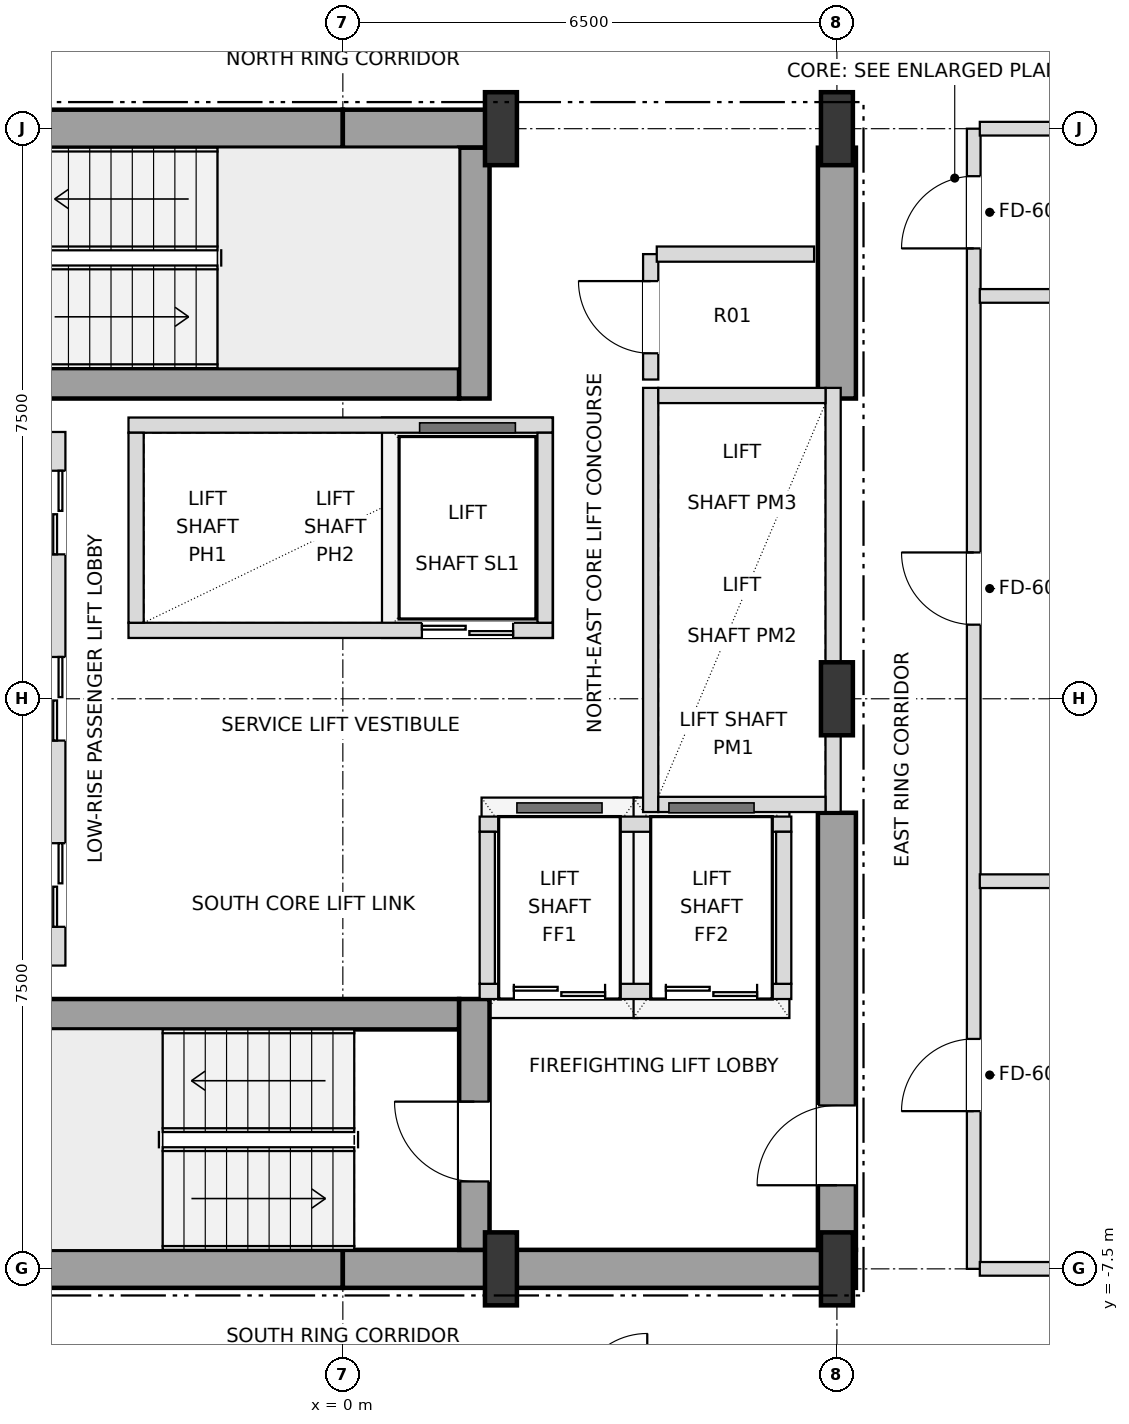
"""IFC4 building model, lengths in metres.
Left out: names, types, materials, properties, quantities, classifications, styles, units other than length and angle.
Written with IfcOpenShell. Run it as: python <this file> out.ifc"""

import sys

from ifc_helpers import new_model, si_unit, direction, frame, frame_2d, origin, origin_2d, place, context, subcontext, project, spatial, rectangle, i_section, extrude, element, fill, save


model = new_model("IFC4")
c1 = context("Model", 3, precision=1e-05, world=origin(), true_north=direction((0.0, 1.0)))
c2 = subcontext(c1, "Body", "Model", "MODEL_VIEW")
j1 = project(units=[si_unit("LENGTHUNIT", "METRE"), si_unit("PLANEANGLEUNIT", "RADIAN")], contexts=[c1])
p1 = place(None, origin())
s1 = spatial("IfcSite", under=j1, at=p1, CompositionType="ELEMENT")
p2 = place(p1, origin())
s2 = spatial("IfcBuilding", under=s1, at=p2, CompositionType="ELEMENT")
p3 = place(p2, frame((0.0, 0.0, 82.8)))
s3 = spatial("IfcBuildingStorey", under=s2, at=p3, CompositionType="ELEMENT", Elevation=82.8)
for number, where, z_axis, x_axis in (
    (1, (2.08, -7.5, 0.0), (0.0, 0.0, 1.0), (1.0, 0.0, 0.0)),
    (2, (6.5, -7.5, 0.0), (0.0, 0.0, 1.0), (1.0, 0.0, 0.0)),
    (3, (6.5, 0.0, 0.0), (0.0, 0.0, 1.0), (1.0, 0.0, 0.0)),
    (4, (2.08, 7.5, 0.0), (0.0, 0.0, 1.0), (1.0, 0.0, 0.0)),
    (5, (6.5, 7.5, 0.0), (0.0, 0.0, 1.0), (1.0, 0.0, 0.0)),
):
    element("IfcColumn", number, at=place(p3, frame(where, z_axis=z_axis, x_axis=x_axis)), inside=s3, PredefinedType="COLUMN", context=c2, shape_type="SweptSolid", body=[
        extrude(i_section(OverallWidth=0.42, OverallDepth=0.96, WebThickness=0.022, FlangeThickness=0.034, at=origin_2d()), origin(), (0.0, 0.0, 1.0), 3.6),
    ])
for number, where, z_axis, x_axis in (
    (6, (-6.75, -7.5, 0.0), (0.0, 0.0, 1.0), (1.0, 0.0, 0.0)),
    (7, (0.0, -7.5, 0.0), (0.0, 0.0, 1.0), (1.0, 0.0, 0.0)),
):
    element("IfcWall", number, at=place(p3, frame(where, z_axis=z_axis, x_axis=x_axis)), inside=s3, PredefinedType="SHEAR", context=c2, shape_type="SweptSolid", body=[
        extrude(rectangle(XDim=6.75, YDim=0.5, at=frame_2d((3.375, 0.0))), origin(), (0.0, 0.0, 1.0), 3.38),
    ])
p4 = place(p3, frame((-6.75, 7.5, 0.0), z_axis=(0.0, 0.0, 1.0), x_axis=(1.0, 0.0, 0.0)))
e8 = element("IfcWall", 8, at=p4, inside=s3, PredefinedType="SHEAR", context=c2, shape_type="SweptSolid", body=[
    extrude(rectangle(XDim=6.75, YDim=0.5, at=frame_2d((3.375, 0.0))), origin(), (0.0, 0.0, 1.0), 3.38),
])
p5 = place(p4, frame((1.65, 0.0, 0.0)))
e9 = element("IfcOpeningElement", 9, at=p5, cuts=e8, PredefinedType="OPENING", context=c2, shape_type="SweptSolid", body=[
    extrude(rectangle(XDim=1.05, YDim=2.15, at=frame_2d((0.525, 1.075))), frame((0.0, 0.26, 0.0), z_axis=(0.0, -1.0, 0.0), x_axis=(1.0, 0.0, 0.0)), (0.0, 0.0, 1.0), 0.52),
])
p6 = place(p3, frame((0.0, 7.5, 0.0), z_axis=(0.0, 0.0, 1.0), x_axis=(1.0, 0.0, 0.0)))
e10 = element("IfcWall", 10, at=p6, inside=s3, PredefinedType="SHEAR", context=c2, shape_type="SweptSolid", body=[
    extrude(rectangle(XDim=2.08, YDim=0.5, at=frame_2d((1.04, 0.0))), origin(), (0.0, 0.0, 1.0), 3.38),
])
p7 = place(p3, frame((6.5, -7.25, 0.0), z_axis=(0.0, 0.0, 1.0), x_axis=(0.0, 1.0, 0.0)))
e11 = element("IfcWall", 11, at=p7, inside=s3, PredefinedType="SHEAR", context=c2, shape_type="SweptSolid", body=[
    extrude(rectangle(XDim=5.75, YDim=0.5, at=frame_2d((2.875, 0.0))), origin(), (0.0, 0.0, 1.0), 3.38),
])
p8 = place(p7, frame((0.85, 0.0, 0.0)))
e12 = element("IfcOpeningElement", 12, at=p8, cuts=e11, PredefinedType="OPENING", context=c2, shape_type="SweptSolid", body=[
    extrude(rectangle(XDim=1.05, YDim=2.15, at=frame_2d((0.525, 1.075))), frame((0.0, 0.26, 0.0), z_axis=(0.0, -1.0, 0.0), x_axis=(1.0, 0.0, 0.0)), (0.0, 0.0, 1.0), 0.52),
])
p9 = place(p3, frame((6.5, 3.95, 0.0), z_axis=(0.0, 0.0, 1.0), x_axis=(0.0, 1.0, 0.0)))
e13 = element("IfcWall", 13, at=p9, inside=s3, PredefinedType="SHEAR", context=c2, shape_type="SweptSolid", body=[
    extrude(rectangle(XDim=3.3, YDim=0.5, at=frame_2d((1.65, 0.0))), origin(), (0.0, 0.0, 1.0), 3.38),
])
p10 = place(p3, frame((-6.25, -4.15, 0.0), z_axis=(0.0, 0.0, 1.0), x_axis=(1.0, 0.0, 0.0)))
e14 = element("IfcWall", 14, at=p10, inside=s3, PredefinedType="SHEAR", context=c2, shape_type="SweptSolid", body=[
    extrude(rectangle(XDim=7.78, YDim=0.4, at=frame_2d((3.89, 0.0))), origin(), (0.0, 0.0, 1.0), 3.38),
])
p11 = place(p3, frame((1.73, -7.25, 0.0), z_axis=(0.0, 0.0, 1.0), x_axis=(0.0, 1.0, 0.0)))
e15 = element("IfcWall", 15, at=p11, inside=s3, PredefinedType="SHEAR", context=c2, shape_type="SweptSolid", body=[
    extrude(rectangle(XDim=3.3, YDim=0.4, at=frame_2d((1.65, 0.0))), origin(), (0.0, 0.0, 1.0), 3.38),
])
p12 = place(p11, frame((0.9, 0.0, 0.0)))
e16 = element("IfcOpeningElement", 16, at=p12, cuts=e15, PredefinedType="OPENING", context=c2, shape_type="SweptSolid", body=[
    extrude(rectangle(XDim=1.05, YDim=2.15, at=frame_2d((0.525, 1.075))), frame((0.0, 0.21, 0.0), z_axis=(0.0, -1.0, 0.0), x_axis=(1.0, 0.0, 0.0)), (0.0, 0.0, 1.0), 0.42),
])
p13 = place(p3, frame((-5.55, 4.15, 0.0), z_axis=(0.0, 0.0, 1.0), x_axis=(1.0, 0.0, 0.0)))
e17 = element("IfcWall", 17, at=p13, inside=s3, PredefinedType="SHEAR", context=c2, shape_type="SweptSolid", body=[
    extrude(rectangle(XDim=7.08, YDim=0.4, at=frame_2d((3.54, 0.0))), origin(), (0.0, 0.0, 1.0), 3.38),
])
p14 = place(p3, frame((1.73, 3.95, 0.0), z_axis=(0.0, 0.0, 1.0), x_axis=(0.0, 1.0, 0.0)))
e18 = element("IfcWall", 18, at=p14, inside=s3, PredefinedType="SHEAR", context=c2, shape_type="SweptSolid", body=[
    extrude(rectangle(XDim=3.3, YDim=0.4, at=frame_2d((1.65, 0.0))), origin(), (0.0, 0.0, 1.0), 3.38),
])
p15 = place(p3, frame((-3.75, -3.51, 0.0), z_axis=(0.0, 0.0, 1.0), x_axis=(0.0, 1.0, 0.0)))
e19 = element("IfcWall", 19, at=p15, inside=s3, PredefinedType="SOLIDWALL", context=c2, shape_type="SweptSolid", body=[
    extrude(rectangle(XDim=7.02, YDim=0.2, at=frame_2d((3.51, 0.0))), origin(), (0.0, 0.0, 1.0), 3.38),
])
p16 = place(p15, frame((0.51, 0.0, 0.0)))
e20 = element("IfcOpeningElement", 20, at=p16, cuts=e19, PredefinedType="OPENING", context=c2, shape_type="SweptSolid", body=[
    extrude(rectangle(XDim=1.1, YDim=2.15, at=frame_2d((0.55, 1.075))), frame((0.0, 0.11, 0.0), z_axis=(0.0, -1.0, 0.0), x_axis=(1.0, 0.0, 0.0)), (0.0, 0.0, 1.0), 0.22),
])
p17 = place(p15, frame((2.96, 0.0, 0.0)))
e21 = element("IfcOpeningElement", 21, at=p17, cuts=e19, PredefinedType="OPENING", context=c2, shape_type="SweptSolid", body=[
    extrude(rectangle(XDim=1.1, YDim=2.15, at=frame_2d((0.55, 1.075))), frame((0.0, 0.11, 0.0), z_axis=(0.0, -1.0, 0.0), x_axis=(1.0, 0.0, 0.0)), (0.0, 0.0, 1.0), 0.22),
])
p18 = place(p15, frame((5.41, 0.0, 0.0)))
e22 = element("IfcOpeningElement", 22, at=p18, cuts=e19, PredefinedType="OPENING", context=c2, shape_type="SweptSolid", body=[
    extrude(rectangle(XDim=1.1, YDim=2.15, at=frame_2d((0.55, 1.075))), frame((0.0, 0.11, 0.0), z_axis=(0.0, -1.0, 0.0), x_axis=(1.0, 0.0, 0.0)), (0.0, 0.0, 1.0), 0.22),
])
p19 = place(p3, frame((4.05, -1.49, 0.0), z_axis=(0.0, 0.0, 1.0), x_axis=(0.0, 1.0, 0.0)))
e23 = element("IfcWall", 23, at=p19, inside=s3, PredefinedType="SOLIDWALL", context=c2, shape_type="SweptSolid", body=[
    extrude(rectangle(XDim=5.58, YDim=0.2, at=frame_2d((2.79, 0.0))), origin(), (0.0, 0.0, 1.0), 3.38),
])
p20 = place(p3, frame((6.45, -1.49, 0.0), z_axis=(0.0, 0.0, 1.0), x_axis=(0.0, 1.0, 0.0)))
e24 = element("IfcWall", 24, at=p20, inside=s3, PredefinedType="SOLIDWALL", context=c2, shape_type="SweptSolid", body=[
    extrude(rectangle(XDim=5.58, YDim=0.2, at=frame_2d((2.79, 0.0))), origin(), (0.0, 0.0, 1.0), 2.816),
])
for number, where, z_axis, x_axis in (
    (25, (4.15, -1.39, 0.0), (0.0, 0.0, 1.0), (1.0, 0.0, 0.0)),
    (26, (4.15, 3.99, 0.0), (0.0, 0.0, 1.0), (1.0, 0.0, 0.0)),
):
    element("IfcWall", number, at=place(p3, frame(where, z_axis=z_axis, x_axis=x_axis)), inside=s3, PredefinedType="SOLIDWALL", context=c2, shape_type="SweptSolid", body=[
        extrude(rectangle(XDim=2.2, YDim=0.2, at=frame_2d((1.1, 0.0))), origin(), (0.0, 0.0, 1.0), 3.38),
    ])
p21 = place(p3, frame((-2.82, 0.9, 0.0), z_axis=(0.0, 0.0, 1.0), x_axis=(1.0, 0.0, 0.0)))
e27 = element("IfcWall", 27, at=p21, inside=s3, PredefinedType="SOLIDWALL", context=c2, shape_type="SweptSolid", body=[
    extrude(rectangle(XDim=5.58, YDim=0.2, at=frame_2d((2.79, 0.0))), origin(), (0.0, 0.0, 1.0), 3.38),
])
p22 = place(p21, frame((3.86, 0.0, 0.0)))
e28 = element("IfcOpeningElement", 28, at=p22, cuts=e27, PredefinedType="OPENING", context=c2, shape_type="SweptSolid", body=[
    extrude(rectangle(XDim=1.2, YDim=2.2, at=frame_2d((0.6, 1.1))), frame((0.0, 0.11, 0.0), z_axis=(0.0, -1.0, 0.0), x_axis=(1.0, 0.0, 0.0)), (0.0, 0.0, 1.0), 0.22),
])
p23 = place(p3, frame((-2.82, 3.6, 0.0), z_axis=(0.0, 0.0, 1.0), x_axis=(1.0, 0.0, 0.0)))
e29 = element("IfcWall", 29, at=p23, inside=s3, PredefinedType="SOLIDWALL", context=c2, shape_type="SweptSolid", body=[
    extrude(rectangle(XDim=5.58, YDim=0.2, at=frame_2d((2.79, 0.0))), origin(), (0.0, 0.0, 1.0), 3.38),
])
for number, where, z_axis, x_axis in (
    (30, (-2.72, 1.0, 0.0), (0.0, 0.0, 1.0), (0.0, 1.0, 0.0)),
    (31, (2.66, 1.0, 0.0), (0.0, 0.0, 1.0), (0.0, 1.0, 0.0)),
):
    element("IfcWall", number, at=place(p3, frame(where, z_axis=z_axis, x_axis=x_axis)), inside=s3, PredefinedType="SOLIDWALL", context=c2, shape_type="SweptSolid", body=[
        extrude(rectangle(XDim=2.5, YDim=0.2, at=frame_2d((1.25, 0.0))), origin(), (0.0, 0.0, 1.0), 3.38),
    ])
p24 = place(p3, frame((1.8, -3.85, 0.0), z_axis=(0.0, 0.0, 1.0), x_axis=(1.0, 0.0, 0.0)))
e32 = element("IfcWall", 32, at=p24, inside=s3, PredefinedType="SOLIDWALL", context=c2, shape_type="SweptSolid", body=[
    extrude(rectangle(XDim=4.1, YDim=0.2, at=frame_2d((2.05, 0.0))), origin(), (0.0, 0.0, 1.0), 3.38),
])
p25 = place(p24, frame((0.45, 0.0, 0.0)))
e33 = element("IfcOpeningElement", 33, at=p25, cuts=e32, PredefinedType="OPENING", context=c2, shape_type="SweptSolid", body=[
    extrude(rectangle(XDim=1.2, YDim=2.2, at=frame_2d((0.6, 1.1))), frame((0.0, 0.11, 0.0), z_axis=(0.0, -1.0, 0.0), x_axis=(1.0, 0.0, 0.0)), (0.0, 0.0, 1.0), 0.22),
])
p26 = place(p24, frame((2.45, 0.0, 0.0)))
e34 = element("IfcOpeningElement", 34, at=p26, cuts=e32, PredefinedType="OPENING", context=c2, shape_type="SweptSolid", body=[
    extrude(rectangle(XDim=1.2, YDim=2.2, at=frame_2d((0.6, 1.1))), frame((0.0, 0.11, 0.0), z_axis=(0.0, -1.0, 0.0), x_axis=(1.0, 0.0, 0.0)), (0.0, 0.0, 1.0), 0.22),
])
p27 = place(p3, frame((1.8, -1.65, 0.0), z_axis=(0.0, 0.0, 1.0), x_axis=(1.0, 0.0, 0.0)))
e35 = element("IfcWall", 35, at=p27, inside=s3, PredefinedType="SOLIDWALL", context=c2, shape_type="SweptSolid", body=[
    extrude(rectangle(XDim=4.1, YDim=0.2, at=frame_2d((2.05, 0.0))), origin(), (0.0, 0.0, 1.0), 3.38),
])
for number, where, z_axis, x_axis in (
    (36, (1.9, -3.75, 0.0), (0.0, 0.0, 1.0), (0.0, 1.0, 0.0)),
    (37, (5.8, -3.75, 0.0), (0.0, 0.0, 1.0), (0.0, 1.0, 0.0)),
):
    element("IfcWall", number, at=place(p3, frame(where, z_axis=z_axis, x_axis=x_axis)), inside=s3, PredefinedType="SOLIDWALL", context=c2, shape_type="SweptSolid", body=[
        extrude(rectangle(XDim=2.0, YDim=0.2, at=frame_2d((1.0, 0.0))), origin(), (0.0, 0.0, 1.0), 3.38),
    ])
p28 = place(p3, frame((4.05, 4.2, 0.0), z_axis=(0.0, 0.0, 1.0), x_axis=(0.0, 1.0, 0.0)))
e38 = element("IfcWall", 38, at=p28, inside=s3, PredefinedType="SOLIDWALL", context=c2, shape_type="SweptSolid", body=[
    extrude(rectangle(XDim=1.65, YDim=0.2, at=frame_2d((0.825, 0.0))), origin(), (0.0, 0.0, 1.0), 3.38),
])
p29 = place(p28, frame((0.345, 0.0, 0.0)))
e39 = element("IfcOpeningElement", 39, at=p29, cuts=e38, PredefinedType="OPENING", context=c2, shape_type="SweptSolid", body=[
    extrude(rectangle(XDim=0.95, YDim=2.15, at=frame_2d((0.475, 1.075))), frame((0.0, 0.11, 0.0), z_axis=(0.0, -1.0, 0.0), x_axis=(1.0, 0.0, 0.0)), (0.0, 0.0, 1.0), 0.22),
])
p30 = place(p3, frame((8.3, -7.5, 0.0), z_axis=(0.0, 0.0, 1.0), x_axis=(0.0, 1.0, 0.0)))
e40 = element("IfcWall", 40, at=p30, inside=s3, PredefinedType="PARTITIONING", context=c2, shape_type="SweptSolid", body=[
    extrude(rectangle(XDim=15.0, YDim=0.18, at=frame_2d((7.5, 0.0))), origin(), (0.0, 0.0, 1.0), 3.38),
])
p31 = place(p30, frame((2.075, 0.0, 0.0)))
e41 = element("IfcOpeningElement", 41, at=p31, cuts=e40, PredefinedType="OPENING", context=c2, shape_type="SweptSolid", body=[
    extrude(rectangle(XDim=0.95, YDim=2.15, at=frame_2d((0.475, 1.075))), frame((0.0, 0.1, 0.0), z_axis=(0.0, -1.0, 0.0), x_axis=(1.0, 0.0, 0.0)), (0.0, 0.0, 1.0), 0.2),
])
p32 = place(p30, frame((8.475, 0.0, 0.0)))
e42 = element("IfcOpeningElement", 42, at=p32, cuts=e40, PredefinedType="OPENING", context=c2, shape_type="SweptSolid", body=[
    extrude(rectangle(XDim=0.95, YDim=2.15, at=frame_2d((0.475, 1.075))), frame((0.0, 0.1, 0.0), z_axis=(0.0, -1.0, 0.0), x_axis=(1.0, 0.0, 0.0)), (0.0, 0.0, 1.0), 0.2),
])
p33 = place(p30, frame((13.425, 0.0, 0.0)))
e43 = element("IfcOpeningElement", 43, at=p33, cuts=e40, PredefinedType="OPENING", context=c2, shape_type="SweptSolid", body=[
    extrude(rectangle(XDim=0.95, YDim=2.15, at=frame_2d((0.475, 1.075))), frame((0.0, 0.1, 0.0), z_axis=(0.0, -1.0, 0.0), x_axis=(1.0, 0.0, 0.0)), (0.0, 0.0, 1.0), 0.2),
])
p34 = place(p3, frame((8.38, -7.5, 0.0), z_axis=(0.0, 0.0, 1.0), x_axis=(1.0, 0.0, 0.0)))
e44 = element("IfcWall", 44, at=p34, inside=s3, PredefinedType="PARTITIONING", context=c2, shape_type="SweptSolid", body=[
    extrude(rectangle(XDim=13.52, YDim=0.18, at=frame_2d((6.76, 0.0))), origin(), (0.0, 0.0, 1.0), 2.816),
])
for number, where, z_axis, x_axis in (
    (45, (8.38, -2.4, 0.0), (0.0, 0.0, 1.0), (1.0, 0.0, 0.0)),
    (46, (8.38, 5.3, 0.0), (0.0, 0.0, 1.0), (1.0, 0.0, 0.0)),
):
    element("IfcWall", number, at=place(p3, frame(where, z_axis=z_axis, x_axis=x_axis)), inside=s3, PredefinedType="PARTITIONING", context=c2, shape_type="SweptSolid", body=[
        extrude(rectangle(XDim=13.44, YDim=0.18, at=frame_2d((6.72, 0.0))), origin(), (0.0, 0.0, 1.0), 2.816),
    ])
p35 = place(p3, frame((4.13, 5.85, 0.0), z_axis=(0.0, 0.0, 1.0), x_axis=(1.0, 0.0, 0.0)))
e47 = element("IfcWall", 47, at=p35, inside=s3, PredefinedType="SOLIDWALL", context=c2, shape_type="SweptSolid", body=[
    extrude(rectangle(XDim=2.07, YDim=0.2, at=frame_2d((1.035, 0.0))), origin(), (0.0, 0.0, 1.0), 3.38),
])
p36 = place(p3, frame((8.38, 7.5, 0.0), z_axis=(0.0, 0.0, 1.0), x_axis=(1.0, 0.0, 0.0)))
e48 = element("IfcWall", 48, at=p36, inside=s3, PredefinedType="PARTITIONING", context=c2, shape_type="SweptSolid", body=[
    extrude(rectangle(XDim=13.52, YDim=0.18, at=frame_2d((6.76, 0.0))), origin(), (0.0, 0.0, 1.0), 2.816),
])
p37 = place(p8, origin())
e49 = element("IfcDoor", 49, at=p37, inside=s3, OperationType="SINGLE_SWING_LEFT", PredefinedType="DOOR", context=c2, shape_type="SweptSolid", body=[
    extrude(rectangle(XDim=1.05, YDim=2.15, at=frame_2d((0.525, 1.075))), frame((0.0, 0.025, 0.0), z_axis=(0.0, -1.0, 0.0), x_axis=(1.0, 0.0, 0.0)), (0.0, 0.0, 1.0), 0.05),
])
fill(e12, e49)
p38 = place(p12, origin())
e50 = element("IfcDoor", 50, at=p38, inside=s3, OperationType="SINGLE_SWING_RIGHT", PredefinedType="DOOR", context=c2, shape_type="SweptSolid", body=[
    extrude(rectangle(XDim=1.05, YDim=2.15, at=frame_2d((0.525, 1.075))), frame((0.0, 0.025, 0.0), z_axis=(0.0, -1.0, 0.0), x_axis=(1.0, 0.0, 0.0)), (0.0, 0.0, 1.0), 0.05),
])
fill(e16, e50)
p39 = place(p16, origin())
e51 = element("IfcDoor", 51, at=p39, inside=s3, OperationType="DOUBLE_DOOR_SLIDING", PredefinedType="DOOR", context=c2, shape_type="SweptSolid", body=[
    extrude(rectangle(XDim=1.1, YDim=2.15, at=frame_2d((0.55, 1.075))), frame((0.0, 0.025, 0.0), z_axis=(0.0, -1.0, 0.0), x_axis=(1.0, 0.0, 0.0)), (0.0, 0.0, 1.0), 0.05),
])
fill(e20, e51)
p40 = place(p17, origin())
e52 = element("IfcDoor", 52, at=p40, inside=s3, OperationType="DOUBLE_DOOR_SLIDING", PredefinedType="DOOR", context=c2, shape_type="SweptSolid", body=[
    extrude(rectangle(XDim=1.1, YDim=2.15, at=frame_2d((0.55, 1.075))), frame((0.0, 0.025, 0.0), z_axis=(0.0, -1.0, 0.0), x_axis=(1.0, 0.0, 0.0)), (0.0, 0.0, 1.0), 0.05),
])
fill(e21, e52)
p41 = place(p18, origin())
e53 = element("IfcDoor", 53, at=p41, inside=s3, OperationType="DOUBLE_DOOR_SLIDING", PredefinedType="DOOR", context=c2, shape_type="SweptSolid", body=[
    extrude(rectangle(XDim=1.1, YDim=2.15, at=frame_2d((0.55, 1.075))), frame((0.0, 0.025, 0.0), z_axis=(0.0, -1.0, 0.0), x_axis=(1.0, 0.0, 0.0)), (0.0, 0.0, 1.0), 0.05),
])
fill(e22, e53)
p42 = place(p22, origin())
e54 = element("IfcDoor", 54, at=p42, inside=s3, OperationType="DOUBLE_DOOR_SLIDING", PredefinedType="DOOR", context=c2, shape_type="SweptSolid", body=[
    extrude(rectangle(XDim=1.2, YDim=2.2, at=frame_2d((0.6, 1.1))), frame((0.0, 0.025, 0.0), z_axis=(0.0, -1.0, 0.0), x_axis=(1.0, 0.0, 0.0)), (0.0, 0.0, 1.0), 0.05),
])
fill(e28, e54)
p43 = place(p25, origin())
e55 = element("IfcDoor", 55, at=p43, inside=s3, OperationType="DOUBLE_DOOR_SLIDING", PredefinedType="DOOR", context=c2, shape_type="SweptSolid", body=[
    extrude(rectangle(XDim=1.2, YDim=2.2, at=frame_2d((0.6, 1.1))), frame((0.0, 0.025, 0.0), z_axis=(0.0, -1.0, 0.0), x_axis=(1.0, 0.0, 0.0)), (0.0, 0.0, 1.0), 0.05),
])
fill(e33, e55)
p44 = place(p26, origin())
e56 = element("IfcDoor", 56, at=p44, inside=s3, OperationType="DOUBLE_DOOR_SLIDING", PredefinedType="DOOR", context=c2, shape_type="SweptSolid", body=[
    extrude(rectangle(XDim=1.2, YDim=2.2, at=frame_2d((0.6, 1.1))), frame((0.0, 0.025, 0.0), z_axis=(0.0, -1.0, 0.0), x_axis=(1.0, 0.0, 0.0)), (0.0, 0.0, 1.0), 0.05),
])
fill(e34, e56)
p45 = place(p29, origin())
e57 = element("IfcDoor", 57, at=p45, inside=s3, OperationType="SINGLE_SWING_RIGHT", PredefinedType="DOOR", context=c2, shape_type="SweptSolid", body=[
    extrude(rectangle(XDim=0.95, YDim=2.15, at=frame_2d((0.475, 1.075))), frame((0.0, 0.025, 0.0), z_axis=(0.0, -1.0, 0.0), x_axis=(1.0, 0.0, 0.0)), (0.0, 0.0, 1.0), 0.05),
])
fill(e39, e57)
p46 = place(p31, origin())
e58 = element("IfcDoor", 58, at=p46, inside=s3, OperationType="SINGLE_SWING_LEFT", PredefinedType="DOOR", context=c2, shape_type="SweptSolid", body=[
    extrude(rectangle(XDim=0.95, YDim=2.15, at=frame_2d((0.475, 1.075))), frame((0.0, 0.025, 0.0), z_axis=(0.0, -1.0, 0.0), x_axis=(1.0, 0.0, 0.0)), (0.0, 0.0, 1.0), 0.05),
])
fill(e41, e58)
p47 = place(p32, origin())
e59 = element("IfcDoor", 59, at=p47, inside=s3, OperationType="SINGLE_SWING_RIGHT", PredefinedType="DOOR", context=c2, shape_type="SweptSolid", body=[
    extrude(rectangle(XDim=0.95, YDim=2.15, at=frame_2d((0.475, 1.075))), frame((0.0, 0.025, 0.0), z_axis=(0.0, -1.0, 0.0), x_axis=(1.0, 0.0, 0.0)), (0.0, 0.0, 1.0), 0.05),
])
fill(e42, e59)
p48 = place(p33, origin())
e60 = element("IfcDoor", 60, at=p48, inside=s3, OperationType="SINGLE_SWING_LEFT", PredefinedType="DOOR", context=c2, shape_type="SweptSolid", body=[
    extrude(rectangle(XDim=0.95, YDim=2.15, at=frame_2d((0.475, 1.075))), frame((0.0, 0.025, 0.0), z_axis=(0.0, -1.0, 0.0), x_axis=(1.0, 0.0, 0.0)), (0.0, 0.0, 1.0), 0.05),
])
fill(e43, e60)
save(model, sys.argv[1])
